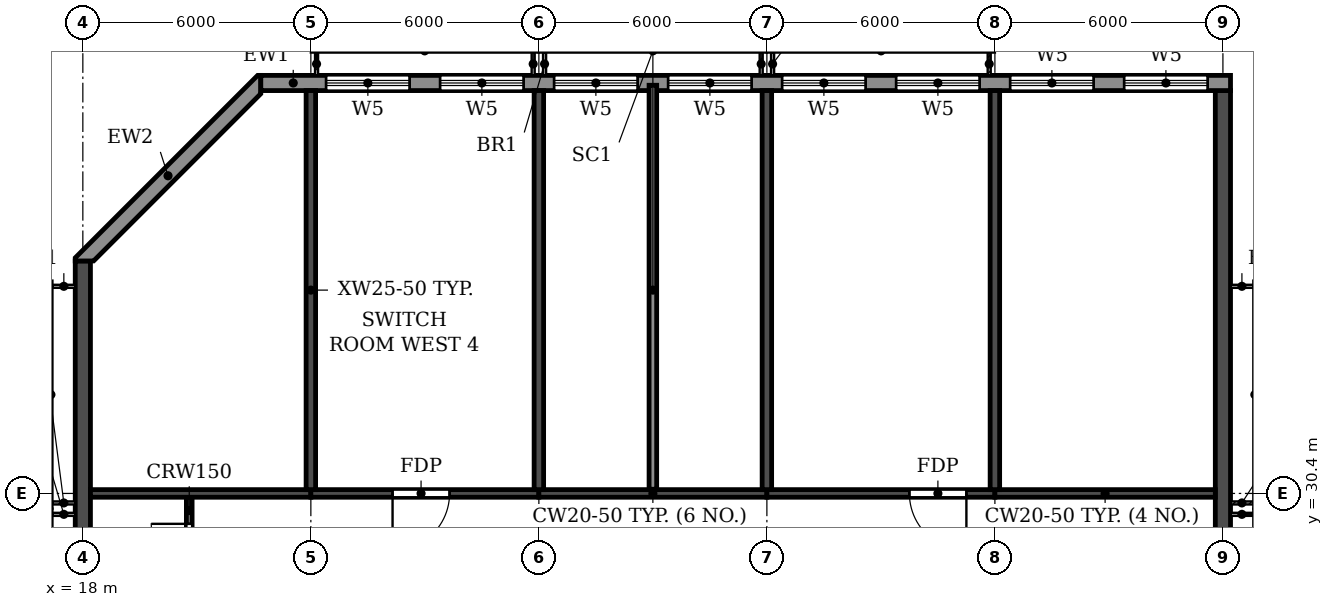
"""IFC4 building model, lengths in metres.
Left out: names, types, materials, properties, quantities, classifications, styles, units other than length and angle.
Written with IfcOpenShell. Run it as: python <this file> out.ifc"""

import sys

from ifc_helpers import new_model, si_unit, direction, frame, frame_2d, origin, place, context, subcontext, project, spatial, polyline, rectangle, outline, extrude, element, fill, save


model = new_model("IFC4")
c1 = context("Model", 3, precision=1e-05, world=origin(), true_north=direction((0.0, 1.0)))
c2 = subcontext(c1, "Body", "Model", "MODEL_VIEW")
j1 = project(units=[si_unit("LENGTHUNIT", "METRE"), si_unit("PLANEANGLEUNIT", "RADIAN")], contexts=[c1])
p1 = place(None, origin())
s1 = spatial("IfcSite", under=j1, at=p1, CompositionType="ELEMENT")
p2 = place(p1, origin())
s2 = spatial("IfcBuilding", under=s1, at=p2, CompositionType="ELEMENT")
p3 = place(p2, frame((0.0, 0.0, 285.6)))
s3 = spatial("IfcBuildingStorey", under=s2, at=p3, CompositionType="ELEMENT", Elevation=285.6)
for number, where, z_axis, x_axis in (
    (1, (24.0, 30.5, 0.0), (0.0, 0.0, 1.0), (0.0, 1.0, 0.0)),
    (2, (30.0, 30.5, 0.0), (0.0, 0.0, 1.0), (0.0, 1.0, 0.0)),
    (3, (36.0, 30.5, 0.0), (0.0, 0.0, 1.0), (0.0, 1.0, 0.0)),
    (4, (42.0, 30.5, 0.0), (0.0, 0.0, 1.0), (0.0, 1.0, 0.0)),
):
    element("IfcWall", number, at=place(p3, frame(where, z_axis=z_axis, x_axis=x_axis)), inside=s3, PredefinedType="SHEAR", context=c2, shape_type="SweptSolid", body=[
        extrude(rectangle(XDim=10.5, YDim=0.25, at=frame_2d((5.25, 0.0))), origin(), (0.0, 0.0, 1.0), 3.05),
    ])
p4 = place(p3, frame((18.0, 4.683, 0.0), z_axis=(0.0, 0.0, 1.0), x_axis=(0.0, 1.0, 0.0)))
e5 = element("IfcWall", 5, at=p4, inside=s3, PredefinedType="SHEAR", context=c2, shape_type="SweptSolid", body=[
    extrude(rectangle(XDim=31.834, YDim=0.4, at=frame_2d((15.917, 0.0))), origin(), (0.0, 0.0, 1.0), 3.05),
])
p5 = place(p3, frame((48.0, 0.2, 0.0), z_axis=(0.0, 0.0, 1.0), x_axis=(0.0, 1.0, 0.0)))
e6 = element("IfcWall", 6, at=p5, inside=s3, PredefinedType="SHEAR", context=c2, shape_type="SweptSolid", body=[
    extrude(rectangle(XDim=40.8, YDim=0.4, at=frame_2d((20.4, 0.0))), origin(), (0.0, 0.0, 1.0), 3.05),
])
p6 = place(p3, frame((18.2, 30.4, 0.0), z_axis=(0.0, 0.0, 1.0), x_axis=(1.0, 0.0, 0.0)))
e7 = element("IfcWall", 7, at=p6, inside=s3, PredefinedType="SHEAR", context=c2, shape_type="SweptSolid", body=[
    extrude(rectangle(XDim=5.8, YDim=0.2, at=frame_2d((2.9, 0.0))), origin(), (0.0, 0.0, 1.0), 2.45),
])
p7 = place(p3, frame((24.0, 30.4, 0.0), z_axis=(0.0, 0.0, 1.0), x_axis=(1.0, 0.0, 0.0)))
e8 = element("IfcWall", 8, at=p7, inside=s3, PredefinedType="SHEAR", context=c2, shape_type="SweptSolid", body=[
    extrude(rectangle(XDim=6.0, YDim=0.2, at=frame_2d((3.0, 0.0))), origin(), (0.0, 0.0, 1.0), 2.45),
])
p8 = place(p7, frame((2.15, 0.0, 0.0)))
e9 = element("IfcOpeningElement", 9, at=p8, cuts=e8, PredefinedType="OPENING", context=c2, shape_type="SweptSolid", body=[
    extrude(rectangle(XDim=1.5, YDim=2.1, at=frame_2d((0.75, 1.05))), frame((0.0, 0.11, 0.0), z_axis=(0.0, -1.0, 0.0), x_axis=(1.0, 0.0, 0.0)), (0.0, 0.0, 1.0), 0.22),
])
p9 = place(p3, frame((30.0, 30.4, 0.0), z_axis=(0.0, 0.0, 1.0), x_axis=(1.0, 0.0, 0.0)))
e10 = element("IfcWall", 10, at=p9, inside=s3, PredefinedType="SHEAR", context=c2, shape_type="SweptSolid", body=[
    extrude(rectangle(XDim=6.0, YDim=0.2, at=frame_2d((3.0, 0.0))), origin(), (0.0, 0.0, 1.0), 2.45),
])
p10 = place(p3, frame((36.0, 30.4, 0.0), z_axis=(0.0, 0.0, 1.0), x_axis=(1.0, 0.0, 0.0)))
e11 = element("IfcWall", 11, at=p10, inside=s3, PredefinedType="SHEAR", context=c2, shape_type="SweptSolid", body=[
    extrude(rectangle(XDim=6.0, YDim=0.2, at=frame_2d((3.0, 0.0))), origin(), (0.0, 0.0, 1.0), 2.45),
])
p11 = place(p10, frame((3.75, 0.0, 0.0)))
e12 = element("IfcOpeningElement", 12, at=p11, cuts=e11, PredefinedType="OPENING", context=c2, shape_type="SweptSolid", body=[
    extrude(rectangle(XDim=1.5, YDim=2.1, at=frame_2d((0.75, 1.05))), frame((0.0, 0.11, 0.0), z_axis=(0.0, -1.0, 0.0), x_axis=(1.0, 0.0, 0.0)), (0.0, 0.0, 1.0), 0.22),
])
p12 = place(p3, frame((42.0, 30.4, 0.0), z_axis=(0.0, 0.0, 1.0), x_axis=(1.0, 0.0, 0.0)))
e13 = element("IfcWall", 13, at=p12, inside=s3, PredefinedType="SHEAR", context=c2, shape_type="SweptSolid", body=[
    extrude(rectangle(XDim=5.8, YDim=0.2, at=frame_2d((2.9, 0.0))), origin(), (0.0, 0.0, 1.0), 2.45),
])
p13 = place(p3, frame((48.2, 41.2, 0.0), z_axis=(0.0, 0.0, 1.0), x_axis=(-1.0, 0.0, 0.0)))
e14 = element("IfcWall", 14, at=p13, inside=s3, PredefinedType="STANDARD", context=c2, shape_type="SweptSolid", body=[
    extrude(rectangle(XDim=25.517, YDim=0.4, at=frame_2d((12.759, 0.0))), origin(), (0.0, 0.0, 1.0), 3.05),
])
p14 = place(p13, frame((21.6, 0.0, 0.6)))
e15 = element("IfcOpeningElement", 15, at=p14, cuts=e14, PredefinedType="OPENING", context=c2, shape_type="SweptSolid", body=[
    extrude(rectangle(XDim=2.2, YDim=2.4, at=frame_2d((1.1, 1.2))), frame((0.0, 0.21, 0.0), z_axis=(0.0, -1.0, 0.0), x_axis=(1.0, 0.0, 0.0)), (0.0, 0.0, 1.0), 0.42),
])
p15 = place(p13, frame((18.6, 0.0, 0.6)))
e16 = element("IfcOpeningElement", 16, at=p15, cuts=e14, PredefinedType="OPENING", context=c2, shape_type="SweptSolid", body=[
    extrude(rectangle(XDim=2.2, YDim=2.4, at=frame_2d((1.1, 1.2))), frame((0.0, 0.21, 0.0), z_axis=(0.0, -1.0, 0.0), x_axis=(1.0, 0.0, 0.0)), (0.0, 0.0, 1.0), 0.42),
])
p16 = place(p13, frame((15.6, 0.0, 0.6)))
e17 = element("IfcOpeningElement", 17, at=p16, cuts=e14, PredefinedType="OPENING", context=c2, shape_type="SweptSolid", body=[
    extrude(rectangle(XDim=2.2, YDim=2.4, at=frame_2d((1.1, 1.2))), frame((0.0, 0.21, 0.0), z_axis=(0.0, -1.0, 0.0), x_axis=(1.0, 0.0, 0.0)), (0.0, 0.0, 1.0), 0.42),
])
p17 = place(p13, frame((12.6, 0.0, 0.6)))
e18 = element("IfcOpeningElement", 18, at=p17, cuts=e14, PredefinedType="OPENING", context=c2, shape_type="SweptSolid", body=[
    extrude(rectangle(XDim=2.2, YDim=2.4, at=frame_2d((1.1, 1.2))), frame((0.0, 0.21, 0.0), z_axis=(0.0, -1.0, 0.0), x_axis=(1.0, 0.0, 0.0)), (0.0, 0.0, 1.0), 0.42),
])
p18 = place(p13, frame((9.6, 0.0, 0.6)))
e19 = element("IfcOpeningElement", 19, at=p18, cuts=e14, PredefinedType="OPENING", context=c2, shape_type="SweptSolid", body=[
    extrude(rectangle(XDim=2.2, YDim=2.4, at=frame_2d((1.1, 1.2))), frame((0.0, 0.21, 0.0), z_axis=(0.0, -1.0, 0.0), x_axis=(1.0, 0.0, 0.0)), (0.0, 0.0, 1.0), 0.42),
])
p19 = place(p13, frame((6.6, 0.0, 0.6)))
e20 = element("IfcOpeningElement", 20, at=p19, cuts=e14, PredefinedType="OPENING", context=c2, shape_type="SweptSolid", body=[
    extrude(rectangle(XDim=2.2, YDim=2.4, at=frame_2d((1.1, 1.2))), frame((0.0, 0.21, 0.0), z_axis=(0.0, -1.0, 0.0), x_axis=(1.0, 0.0, 0.0)), (0.0, 0.0, 1.0), 0.42),
])
p20 = place(p13, frame((3.6, 0.0, 0.6)))
e21 = element("IfcOpeningElement", 21, at=p20, cuts=e14, PredefinedType="OPENING", context=c2, shape_type="SweptSolid", body=[
    extrude(rectangle(XDim=2.2, YDim=2.4, at=frame_2d((1.1, 1.2))), frame((0.0, 0.21, 0.0), z_axis=(0.0, -1.0, 0.0), x_axis=(1.0, 0.0, 0.0)), (0.0, 0.0, 1.0), 0.42),
])
p21 = place(p13, frame((0.6, 0.0, 0.6)))
e22 = element("IfcOpeningElement", 22, at=p21, cuts=e14, PredefinedType="OPENING", context=c2, shape_type="SweptSolid", body=[
    extrude(rectangle(XDim=2.2, YDim=2.4, at=frame_2d((1.1, 1.2))), frame((0.0, 0.21, 0.0), z_axis=(0.0, -1.0, 0.0), x_axis=(1.0, 0.0, 0.0)), (0.0, 0.0, 1.0), 0.42),
])
p22 = place(p3, origin())
e23 = element("IfcWall", 23, at=p22, inside=s3, PredefinedType="STANDARD", context=c2, shape_type="SweptSolid", body=[
    extrude(outline(polyline([(22.683, 41.4), (22.6, 41.4), (17.8, 36.6), (17.8, 36.517), (18.283, 36.517), (22.683, 40.917), (22.683, 41.4)])), origin(), (0.0, 0.0, 1.0), 3.05),
])
p23 = place(p3, frame((20.8, 27.9, 0.0), z_axis=(0.0, 0.0, 1.0), x_axis=(0.0, 1.0, 0.0)))
e24 = element("IfcWall", 24, at=p23, inside=s3, PredefinedType="PARTITIONING", context=c2, shape_type="SweptSolid", body=[
    extrude(rectangle(XDim=2.39, YDim=0.15, at=frame_2d((1.195, 0.0))), origin(), (0.0, 0.0, 1.0), 3.05),
])
p24 = place(p23, frame((0.7, 0.0, 0.0)))
e25 = element("IfcOpeningElement", 25, at=p24, cuts=e24, PredefinedType="OPENING", context=c2, shape_type="SweptSolid", body=[
    extrude(rectangle(XDim=1.0, YDim=2.1, at=frame_2d((0.5, 1.05))), frame((0.0, 0.085, 0.0), z_axis=(0.0, -1.0, 0.0), x_axis=(1.0, 0.0, 0.0)), (0.0, 0.0, 1.0), 0.17),
])
p25 = place(p3, frame((33.0, 30.51, 0.0), z_axis=(0.0, 0.0, 1.0), x_axis=(0.0, 1.0, 0.0)))
e26 = element("IfcWall", 26, at=p25, inside=s3, PredefinedType="PARTITIONING", context=c2, shape_type="SweptSolid", body=[
    extrude(rectangle(XDim=10.63, YDim=0.2, at=frame_2d((5.315, 0.0))), origin(), (0.0, 0.0, 1.0), 3.05),
])
p26 = place(p14, origin())
e27 = element("IfcWindow", 27, at=p26, inside=s3, PartitioningType="TRIPLE_PANEL_HORIZONTAL", PredefinedType="WINDOW", context=c2, shape_type="SweptSolid", body=[
    extrude(rectangle(XDim=2.2, YDim=2.4, at=frame_2d((1.1, 1.2))), frame((0.0, 0.03, 0.0), z_axis=(0.0, -1.0, 0.0), x_axis=(1.0, 0.0, 0.0)), (0.0, 0.0, 1.0), 0.06),
])
fill(e15, e27)
p27 = place(p15, origin())
e28 = element("IfcWindow", 28, at=p27, inside=s3, PartitioningType="TRIPLE_PANEL_HORIZONTAL", PredefinedType="WINDOW", context=c2, shape_type="SweptSolid", body=[
    extrude(rectangle(XDim=2.2, YDim=2.4, at=frame_2d((1.1, 1.2))), frame((0.0, 0.03, 0.0), z_axis=(0.0, -1.0, 0.0), x_axis=(1.0, 0.0, 0.0)), (0.0, 0.0, 1.0), 0.06),
])
fill(e16, e28)
p28 = place(p16, origin())
e29 = element("IfcWindow", 29, at=p28, inside=s3, PartitioningType="TRIPLE_PANEL_HORIZONTAL", PredefinedType="WINDOW", context=c2, shape_type="SweptSolid", body=[
    extrude(rectangle(XDim=2.2, YDim=2.4, at=frame_2d((1.1, 1.2))), frame((0.0, 0.03, 0.0), z_axis=(0.0, -1.0, 0.0), x_axis=(1.0, 0.0, 0.0)), (0.0, 0.0, 1.0), 0.06),
])
fill(e17, e29)
p29 = place(p17, origin())
e30 = element("IfcWindow", 30, at=p29, inside=s3, PartitioningType="TRIPLE_PANEL_HORIZONTAL", PredefinedType="WINDOW", context=c2, shape_type="SweptSolid", body=[
    extrude(rectangle(XDim=2.2, YDim=2.4, at=frame_2d((1.1, 1.2))), frame((0.0, 0.03, 0.0), z_axis=(0.0, -1.0, 0.0), x_axis=(1.0, 0.0, 0.0)), (0.0, 0.0, 1.0), 0.06),
])
fill(e18, e30)
p30 = place(p18, origin())
e31 = element("IfcWindow", 31, at=p30, inside=s3, PartitioningType="TRIPLE_PANEL_HORIZONTAL", PredefinedType="WINDOW", context=c2, shape_type="SweptSolid", body=[
    extrude(rectangle(XDim=2.2, YDim=2.4, at=frame_2d((1.1, 1.2))), frame((0.0, 0.03, 0.0), z_axis=(0.0, -1.0, 0.0), x_axis=(1.0, 0.0, 0.0)), (0.0, 0.0, 1.0), 0.06),
])
fill(e19, e31)
p31 = place(p19, origin())
e32 = element("IfcWindow", 32, at=p31, inside=s3, PartitioningType="TRIPLE_PANEL_HORIZONTAL", PredefinedType="WINDOW", context=c2, shape_type="SweptSolid", body=[
    extrude(rectangle(XDim=2.2, YDim=2.4, at=frame_2d((1.1, 1.2))), frame((0.0, 0.03, 0.0), z_axis=(0.0, -1.0, 0.0), x_axis=(1.0, 0.0, 0.0)), (0.0, 0.0, 1.0), 0.06),
])
fill(e20, e32)
p32 = place(p20, origin())
e33 = element("IfcWindow", 33, at=p32, inside=s3, PartitioningType="TRIPLE_PANEL_HORIZONTAL", PredefinedType="WINDOW", context=c2, shape_type="SweptSolid", body=[
    extrude(rectangle(XDim=2.2, YDim=2.4, at=frame_2d((1.1, 1.2))), frame((0.0, 0.03, 0.0), z_axis=(0.0, -1.0, 0.0), x_axis=(1.0, 0.0, 0.0)), (0.0, 0.0, 1.0), 0.06),
])
fill(e21, e33)
p33 = place(p21, origin())
e34 = element("IfcWindow", 34, at=p33, inside=s3, PartitioningType="TRIPLE_PANEL_HORIZONTAL", PredefinedType="WINDOW", context=c2, shape_type="SweptSolid", body=[
    extrude(rectangle(XDim=2.2, YDim=2.4, at=frame_2d((1.1, 1.2))), frame((0.0, 0.03, 0.0), z_axis=(0.0, -1.0, 0.0), x_axis=(1.0, 0.0, 0.0)), (0.0, 0.0, 1.0), 0.06),
])
fill(e22, e34)
p34 = place(p8, frame((1.5, 0.0, 0.0), z_axis=(0.0, 0.0, 1.0), x_axis=(-1.0, 0.0, 0.0)))
e35 = element("IfcDoor", 35, at=p34, inside=s3, OperationType="DOUBLE_DOOR_SINGLE_SWING", PredefinedType="DOOR", context=c2, shape_type="SweptSolid", body=[
    extrude(rectangle(XDim=1.5, YDim=2.1, at=frame_2d((0.75, 1.05))), frame((0.0, 0.025, 0.0), z_axis=(0.0, -1.0, 0.0), x_axis=(1.0, 0.0, 0.0)), (0.0, 0.0, 1.0), 0.05),
])
fill(e9, e35)
p35 = place(p11, frame((1.5, 0.0, 0.0), z_axis=(0.0, 0.0, 1.0), x_axis=(-1.0, 0.0, 0.0)))
e36 = element("IfcDoor", 36, at=p35, inside=s3, OperationType="DOUBLE_DOOR_SINGLE_SWING", PredefinedType="DOOR", context=c2, shape_type="SweptSolid", body=[
    extrude(rectangle(XDim=1.5, YDim=2.1, at=frame_2d((0.75, 1.05))), frame((0.0, 0.025, 0.0), z_axis=(0.0, -1.0, 0.0), x_axis=(1.0, 0.0, 0.0)), (0.0, 0.0, 1.0), 0.05),
])
fill(e12, e36)
p36 = place(p24, origin())
e37 = element("IfcDoor", 37, at=p36, inside=s3, OperationType="SINGLE_SWING_RIGHT", PredefinedType="DOOR", context=c2, shape_type="SweptSolid", body=[
    extrude(rectangle(XDim=1.0, YDim=2.1, at=frame_2d((0.5, 1.05))), frame((0.0, 0.025, 0.0), z_axis=(0.0, -1.0, 0.0), x_axis=(1.0, 0.0, 0.0)), (0.0, 0.0, 1.0), 0.05),
])
fill(e25, e37)
save(model, sys.argv[1])
